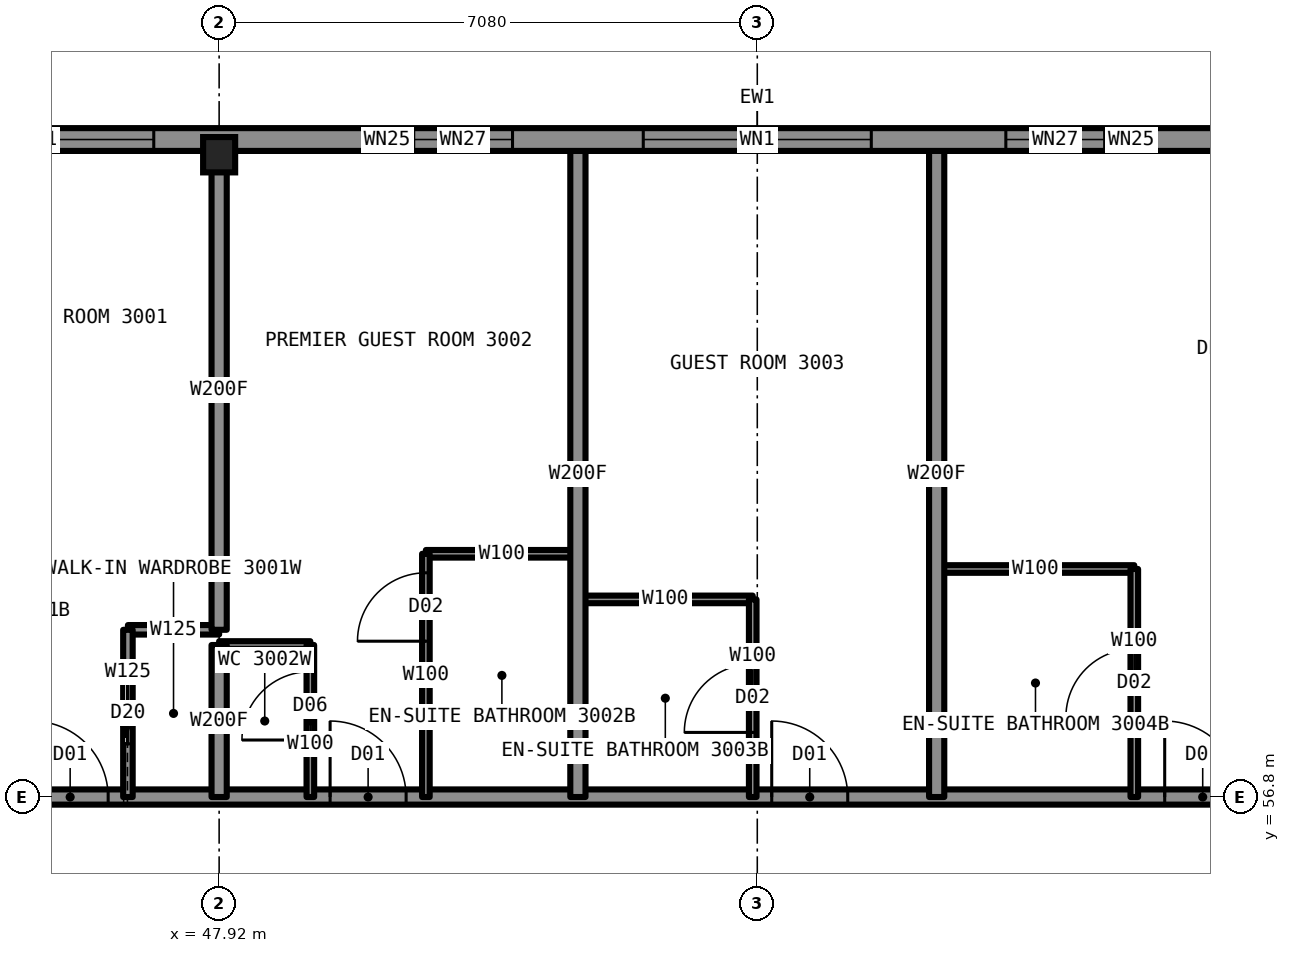
"""IFC4 building model, lengths in metres.
Left out: names, types, materials, properties, quantities, classifications, styles, units other than length and angle.
Written with IfcOpenShell. Run it as: python <this file> out.ifc"""

import sys

from ifc_helpers import new_model, si_unit, direction, frame, frame_2d, origin, origin_2d, place, context, subcontext, project, spatial, rectangle, i_section, extrude, element, fill, save


model = new_model("IFC4")
c1 = context("Model", 3, precision=1e-05, world=origin(), true_north=direction((0.0, 1.0)))
c2 = subcontext(c1, "Body", "Model", "MODEL_VIEW")
j1 = project(units=[si_unit("LENGTHUNIT", "METRE"), si_unit("PLANEANGLEUNIT", "RADIAN")], contexts=[c1])
p1 = place(None, origin())
s1 = spatial("IfcSite", under=j1, at=p1, CompositionType="ELEMENT")
p2 = place(p1, origin())
s2 = spatial("IfcBuilding", under=s1, at=p2, CompositionType="ELEMENT")
p3 = place(p2, frame((0.0, 0.0, 114.4)))
s3 = spatial("IfcBuildingStorey", under=s2, at=p3, CompositionType="ELEMENT", Elevation=114.4)
p4 = place(p3, frame((47.92, 65.25, 0.0), z_axis=(0.0, 0.0, 1.0), x_axis=(1.0, 0.0, 0.0)))
e1 = element("IfcColumn", 1, at=p4, inside=s3, PredefinedType="COLUMN", context=c2, shape_type="SweptSolid", body=[
    extrude(i_section(OverallWidth=0.422, OverallDepth=0.465, WebThickness=0.045, FlangeThickness=0.073, at=origin_2d()), origin(), (0.0, 0.0, 1.0), 3.5),
])
p5 = place(p3, frame((43.2, 56.8, 0.0), z_axis=(0.0, 0.0, 1.0), x_axis=(1.0, 0.0, 0.0)))
e2 = element("IfcWall", 2, at=p5, inside=s3, PredefinedType="PARTITIONING", context=c2, shape_type="SweptSolid", body=[
    extrude(rectangle(XDim=23.6, YDim=0.2, at=frame_2d((11.8, 0.0))), origin(), (0.0, 0.0, 1.0), 3.33),
])
p6 = place(p5, frame((2.26, 0.0, 0.0)))
e3 = element("IfcOpeningElement", 3, at=p6, cuts=e2, PredefinedType="OPENING", context=c2, shape_type="SweptSolid", body=[
    extrude(rectangle(XDim=1.0, YDim=2.2, at=frame_2d((0.5, 1.1))), frame((0.0, 0.11, 0.0), z_axis=(0.0, -1.0, 0.0), x_axis=(1.0, 0.0, 0.0)), (0.0, 0.0, 1.0), 0.22),
])
p7 = place(p5, frame((6.18, 0.0, 0.0)))
e4 = element("IfcOpeningElement", 4, at=p7, cuts=e2, PredefinedType="OPENING", context=c2, shape_type="SweptSolid", body=[
    extrude(rectangle(XDim=1.0, YDim=2.2, at=frame_2d((0.5, 1.1))), frame((0.0, 0.11, 0.0), z_axis=(0.0, -1.0, 0.0), x_axis=(1.0, 0.0, 0.0)), (0.0, 0.0, 1.0), 0.22),
])
p8 = place(p5, frame((11.99, 0.0, 0.0)))
e5 = element("IfcOpeningElement", 5, at=p8, cuts=e2, PredefinedType="OPENING", context=c2, shape_type="SweptSolid", body=[
    extrude(rectangle(XDim=1.0, YDim=2.2, at=frame_2d((0.5, 1.1))), frame((0.0, 0.11, 0.0), z_axis=(0.0, -1.0, 0.0), x_axis=(1.0, 0.0, 0.0)), (0.0, 0.0, 1.0), 0.22),
])
p9 = place(p5, frame((17.16, 0.0, 0.0)))
e6 = element("IfcOpeningElement", 6, at=p9, cuts=e2, PredefinedType="OPENING", context=c2, shape_type="SweptSolid", body=[
    extrude(rectangle(XDim=1.0, YDim=2.2, at=frame_2d((0.5, 1.1))), frame((0.0, 0.11, 0.0), z_axis=(0.0, -1.0, 0.0), x_axis=(1.0, 0.0, 0.0)), (0.0, 0.0, 1.0), 0.22),
])
p10 = place(p3, frame((47.92, 58.8, 0.0), z_axis=(0.0, 0.0, 1.0), x_axis=(1.0, 0.0, 0.0)))
e7 = element("IfcWall", 7, at=p10, inside=s3, PredefinedType="PARTITIONING", context=c2, shape_type="SweptSolid", body=[
    extrude(rectangle(XDim=1.2, YDim=0.1, at=frame_2d((0.6, 0.0))), origin(), (0.0, 0.0, 1.0), 3.33),
])
p11 = place(p3, frame((46.72, 59.0, 0.0), z_axis=(0.0, 0.0, 1.0), x_axis=(1.0, 0.0, 0.0)))
e8 = element("IfcWall", 8, at=p11, inside=s3, PredefinedType="PARTITIONING", context=c2, shape_type="SweptSolid", body=[
    extrude(rectangle(XDim=1.2, YDim=0.125, at=frame_2d((0.6, 0.0))), origin(), (0.0, 0.0, 1.0), 3.33),
])
p12 = place(p3, frame((52.64, 59.4, 0.0), z_axis=(0.0, 0.0, 1.0), x_axis=(1.0, 0.0, 0.0)))
e9 = element("IfcWall", 9, at=p12, inside=s3, PredefinedType="PARTITIONING", context=c2, shape_type="SweptSolid", body=[
    extrude(rectangle(XDim=2.3, YDim=0.1, at=frame_2d((1.15, 0.0))), origin(), (0.0, 0.0, 1.0), 3.33),
])
p13 = place(p3, frame((57.36, 59.8, 0.0), z_axis=(0.0, 0.0, 1.0), x_axis=(1.0, 0.0, 0.0)))
e10 = element("IfcWall", 10, at=p13, inside=s3, PredefinedType="PARTITIONING", context=c2, shape_type="SweptSolid", body=[
    extrude(rectangle(XDim=2.6, YDim=0.1, at=frame_2d((1.3, 0.0))), origin(), (0.0, 0.0, 1.0), 3.33),
])
p14 = place(p3, frame((50.64, 60.0, 0.0), z_axis=(0.0, 0.0, 1.0), x_axis=(1.0, 0.0, 0.0)))
e11 = element("IfcWall", 11, at=p14, inside=s3, PredefinedType="PARTITIONING", context=c2, shape_type="SweptSolid", body=[
    extrude(rectangle(XDim=2.0, YDim=0.1, at=frame_2d((1.0, 0.0))), origin(), (0.0, 0.0, 1.0), 2.731),
])
p15 = place(p3, frame((54.94, 56.8, 0.0), z_axis=(0.0, 0.0, 1.0), x_axis=(0.0, 1.0, 0.0)))
e12 = element("IfcWall", 12, at=p15, inside=s3, PredefinedType="PARTITIONING", context=c2, shape_type="SweptSolid", body=[
    extrude(rectangle(XDim=2.6, YDim=0.1, at=frame_2d((1.3, 0.0))), origin(), (0.0, 0.0, 1.0), 2.573),
])
p16 = place(p15, frame((0.85, 0.0, 0.0)))
e13 = element("IfcOpeningElement", 13, at=p16, cuts=e12, PredefinedType="OPENING", context=c2, shape_type="SweptSolid", body=[
    extrude(rectangle(XDim=0.9, YDim=2.1, at=frame_2d((0.45, 1.05))), frame((0.0, 0.06, 0.0), z_axis=(0.0, -1.0, 0.0), x_axis=(1.0, 0.0, 0.0)), (0.0, 0.0, 1.0), 0.12),
])
p17 = place(p3, frame((52.64, 56.8, 0.0), z_axis=(0.0, 0.0, 1.0), x_axis=(0.0, 1.0, 0.0)))
e14 = element("IfcWall", 14, at=p17, inside=s3, PredefinedType="PARTITIONING", context=c2, shape_type="SweptSolid", body=[
    extrude(rectangle(XDim=8.5, YDim=0.2, at=frame_2d((4.25, 0.0))), origin(), (0.0, 0.0, 1.0), 3.33),
])
p18 = place(p3, frame((50.64, 56.8, 0.0), z_axis=(0.0, 0.0, 1.0), x_axis=(0.0, 1.0, 0.0)))
e15 = element("IfcWall", 15, at=p18, inside=s3, PredefinedType="PARTITIONING", context=c2, shape_type="SweptSolid", body=[
    extrude(rectangle(XDim=3.2, YDim=0.1, at=frame_2d((1.6, 0.0))), origin(), (0.0, 0.0, 1.0), 3.33),
])
p19 = place(p18, frame((2.05, 0.0, 0.0)))
e16 = element("IfcOpeningElement", 16, at=p19, cuts=e15, PredefinedType="OPENING", context=c2, shape_type="SweptSolid", body=[
    extrude(rectangle(XDim=0.9, YDim=2.1, at=frame_2d((0.45, 1.05))), frame((0.0, 0.06, 0.0), z_axis=(0.0, -1.0, 0.0), x_axis=(1.0, 0.0, 0.0)), (0.0, 0.0, 1.0), 0.12),
])
p20 = place(p3, frame((49.12, 56.8, 0.0), z_axis=(0.0, 0.0, 1.0), x_axis=(0.0, 1.0, 0.0)))
e17 = element("IfcWall", 17, at=p20, inside=s3, PredefinedType="PARTITIONING", context=c2, shape_type="SweptSolid", body=[
    extrude(rectangle(XDim=2.0, YDim=0.1, at=frame_2d((1.0, 0.0))), origin(), (0.0, 0.0, 1.0), 3.33),
])
p21 = place(p20, frame((0.75, 0.0, 0.0)))
e18 = element("IfcOpeningElement", 18, at=p21, cuts=e17, PredefinedType="OPENING", context=c2, shape_type="SweptSolid", body=[
    extrude(rectangle(XDim=0.9, YDim=2.1, at=frame_2d((0.45, 1.05))), frame((0.0, 0.06, 0.0), z_axis=(0.0, -1.0, 0.0), x_axis=(1.0, 0.0, 0.0)), (0.0, 0.0, 1.0), 0.12),
])
p22 = place(p3, frame((47.92, 56.8, 0.0), z_axis=(0.0, 0.0, 1.0), x_axis=(0.0, 1.0, 0.0)))
e19 = element("IfcWall", 19, at=p22, inside=s3, PredefinedType="PARTITIONING", context=c2, shape_type="SweptSolid", body=[
    extrude(rectangle(XDim=2.0, YDim=0.2, at=frame_2d((1.0, 0.0))), origin(), (0.0, 0.0, 1.0), 2.573),
])
p23 = place(p3, frame((47.92, 59.0, 0.0), z_axis=(0.0, 0.0, 1.0), x_axis=(0.0, 1.0, 0.0)))
e20 = element("IfcWall", 20, at=p23, inside=s3, PredefinedType="PARTITIONING", context=c2, shape_type="SweptSolid", body=[
    extrude(rectangle(XDim=6.3, YDim=0.2, at=frame_2d((3.15, 0.0))), origin(), (0.0, 0.0, 1.0), 2.573),
])
p24 = place(p3, frame((46.72, 56.8, 0.0), z_axis=(0.0, 0.0, 1.0), x_axis=(0.0, 1.0, 0.0)))
e21 = element("IfcWall", 21, at=p24, inside=s3, PredefinedType="PARTITIONING", context=c2, shape_type="SweptSolid", body=[
    extrude(rectangle(XDim=2.2, YDim=0.125, at=frame_2d((1.1, 0.0))), origin(), (0.0, 0.0, 1.0), 3.33),
])
p25 = place(p24, frame((0.7, 0.0, 0.0)))
e22 = element("IfcOpeningElement", 22, at=p25, cuts=e21, PredefinedType="OPENING", context=c2, shape_type="SweptSolid", body=[
    extrude(rectangle(XDim=0.8, YDim=2.1, at=frame_2d((0.4, 1.05))), frame((0.0, 0.073, 0.0), z_axis=(0.0, -1.0, 0.0), x_axis=(1.0, 0.0, 0.0)), (0.0, 0.0, 1.0), 0.145),
])
p26 = place(p3, frame((57.36, 56.8, 0.0), z_axis=(0.0, 0.0, 1.0), x_axis=(0.0, 1.0, 0.0)))
e23 = element("IfcWall", 23, at=p26, inside=s3, PredefinedType="PARTITIONING", context=c2, shape_type="SweptSolid", body=[
    extrude(rectangle(XDim=8.5, YDim=0.2, at=frame_2d((4.25, 0.0))), origin(), (0.0, 0.0, 1.0), 3.33),
])
p27 = place(p3, frame((59.96, 56.8, 0.0), z_axis=(0.0, 0.0, 1.0), x_axis=(0.0, 1.0, 0.0)))
e24 = element("IfcWall", 24, at=p27, inside=s3, PredefinedType="PARTITIONING", context=c2, shape_type="SweptSolid", body=[
    extrude(rectangle(XDim=3.0, YDim=0.1, at=frame_2d((1.5, 0.0))), origin(), (0.0, 0.0, 1.0), 3.33),
])
p28 = place(p27, frame((1.05, 0.0, 0.0)))
e25 = element("IfcOpeningElement", 25, at=p28, cuts=e24, PredefinedType="OPENING", context=c2, shape_type="SweptSolid", body=[
    extrude(rectangle(XDim=0.9, YDim=2.1, at=frame_2d((0.45, 1.05))), frame((0.0, 0.06, 0.0), z_axis=(0.0, -1.0, 0.0), x_axis=(1.0, 0.0, 0.0)), (0.0, 0.0, 1.0), 0.12),
])
p29 = place(p3, frame((70.1, 65.45, 0.0), z_axis=(0.0, 0.0, 1.0), x_axis=(-1.0, 0.0, 0.0)))
e26 = element("IfcWall", 26, at=p29, inside=s3, PredefinedType="SOLIDWALL", context=c2, shape_type="SweptSolid", body=[
    extrude(rectangle(XDim=30.2, YDim=0.3, at=frame_2d((15.1, 0.0))), origin(), (0.0, 0.0, 1.0), 2.83),
])
p30 = place(p29, frame((0.85, 0.0, 0.5)))
e27 = element("IfcOpeningElement", 27, at=p30, cuts=e26, PredefinedType="OPENING", context=c2, shape_type="SweptSolid", body=[
    extrude(rectangle(XDim=1.6, YDim=2.0, at=frame_2d((0.8, 1.0))), frame((0.0, 0.16, 0.0), z_axis=(0.0, -1.0, 0.0), x_axis=(1.0, 0.0, 0.0)), (0.0, 0.0, 1.0), 0.32),
])
p31 = place(p29, frame((4.16, 0.0, 0.5)))
e28 = element("IfcOpeningElement", 28, at=p31, cuts=e26, PredefinedType="OPENING", context=c2, shape_type="SweptSolid", body=[
    extrude(rectangle(XDim=3.0, YDim=2.0, at=frame_2d((1.5, 1.0))), frame((0.0, 0.16, 0.0), z_axis=(0.0, -1.0, 0.0), x_axis=(1.0, 0.0, 0.0)), (0.0, 0.0, 1.0), 0.32),
])
p32 = place(p29, frame((10.53, 0.0, 0.5)))
e29 = element("IfcOpeningElement", 29, at=p32, cuts=e26, PredefinedType="OPENING", context=c2, shape_type="SweptSolid", body=[
    extrude(rectangle(XDim=1.3, YDim=1.9, at=frame_2d((0.65, 0.95))), frame((0.0, 0.16, 0.0), z_axis=(0.0, -1.0, 0.0), x_axis=(1.0, 0.0, 0.0)), (0.0, 0.0, 1.0), 0.32),
])
p33 = place(p29, frame((13.6, 0.0, 0.5)))
e30 = element("IfcOpeningElement", 30, at=p33, cuts=e26, PredefinedType="OPENING", context=c2, shape_type="SweptSolid", body=[
    extrude(rectangle(XDim=3.0, YDim=2.0, at=frame_2d((1.5, 1.0))), frame((0.0, 0.16, 0.0), z_axis=(0.0, -1.0, 0.0), x_axis=(1.0, 0.0, 0.0)), (0.0, 0.0, 1.0), 0.32),
])
p34 = place(p29, frame((18.32, 0.0, 0.5)))
e31 = element("IfcOpeningElement", 31, at=p34, cuts=e26, PredefinedType="OPENING", context=c2, shape_type="SweptSolid", body=[
    extrude(rectangle(XDim=1.3, YDim=1.9, at=frame_2d((0.65, 0.95))), frame((0.0, 0.16, 0.0), z_axis=(0.0, -1.0, 0.0), x_axis=(1.0, 0.0, 0.0)), (0.0, 0.0, 1.0), 0.32),
])
p35 = place(p29, frame((23.04, 0.0, 0.5)))
e32 = element("IfcOpeningElement", 32, at=p35, cuts=e26, PredefinedType="OPENING", context=c2, shape_type="SweptSolid", body=[
    extrude(rectangle(XDim=3.0, YDim=2.0, at=frame_2d((1.5, 1.0))), frame((0.0, 0.16, 0.0), z_axis=(0.0, -1.0, 0.0), x_axis=(1.0, 0.0, 0.0)), (0.0, 0.0, 1.0), 0.32),
])
p36 = place(p29, frame((27.75, 0.0, 0.5)))
e33 = element("IfcOpeningElement", 33, at=p36, cuts=e26, PredefinedType="OPENING", context=c2, shape_type="SweptSolid", body=[
    extrude(rectangle(XDim=1.6, YDim=2.0, at=frame_2d((0.8, 1.0))), frame((0.0, 0.16, 0.0), z_axis=(0.0, -1.0, 0.0), x_axis=(1.0, 0.0, 0.0)), (0.0, 0.0, 1.0), 0.32),
])
p37 = place(p29, frame((9.88, 0.0, 0.5)))
e34 = element("IfcOpeningElement", 34, at=p37, cuts=e26, PredefinedType="OPENING", context=c2, shape_type="SweptSolid", body=[
    extrude(rectangle(XDim=0.6, YDim=0.9, at=frame_2d((0.3, 0.45))), frame((0.0, 0.16, 0.0), z_axis=(0.0, -1.0, 0.0), x_axis=(1.0, 0.0, 0.0)), (0.0, 0.0, 1.0), 0.32),
])
p38 = place(p29, frame((19.67, 0.0, 0.5)))
e35 = element("IfcOpeningElement", 35, at=p38, cuts=e26, PredefinedType="OPENING", context=c2, shape_type="SweptSolid", body=[
    extrude(rectangle(XDim=0.6, YDim=0.9, at=frame_2d((0.3, 0.45))), frame((0.0, 0.16, 0.0), z_axis=(0.0, -1.0, 0.0), x_axis=(1.0, 0.0, 0.0)), (0.0, 0.0, 1.0), 0.32),
])
p39 = place(p6, origin())
e36 = element("IfcDoor", 36, at=p39, inside=s3, OperationType="SINGLE_SWING_LEFT", PredefinedType="DOOR", context=c2, shape_type="SweptSolid", body=[
    extrude(rectangle(XDim=1.0, YDim=2.2, at=frame_2d((0.5, 1.1))), frame((0.0, 0.025, 0.0), z_axis=(0.0, -1.0, 0.0), x_axis=(1.0, 0.0, 0.0)), (0.0, 0.0, 1.0), 0.05),
])
fill(e3, e36)
p40 = place(p25, origin())
e37 = element("IfcDoor", 37, at=p40, inside=s3, OperationType="SLIDING_TO_LEFT", PredefinedType="DOOR", context=c2, shape_type="SweptSolid", body=[
    extrude(rectangle(XDim=0.8, YDim=2.1, at=frame_2d((0.4, 1.05))), frame((0.0, 0.025, 0.0), z_axis=(0.0, -1.0, 0.0), x_axis=(1.0, 0.0, 0.0)), (0.0, 0.0, 1.0), 0.05),
])
fill(e22, e37)
p41 = place(p7, origin())
e38 = element("IfcDoor", 38, at=p41, inside=s3, OperationType="SINGLE_SWING_LEFT", PredefinedType="DOOR", context=c2, shape_type="SweptSolid", body=[
    extrude(rectangle(XDim=1.0, YDim=2.2, at=frame_2d((0.5, 1.1))), frame((0.0, 0.025, 0.0), z_axis=(0.0, -1.0, 0.0), x_axis=(1.0, 0.0, 0.0)), (0.0, 0.0, 1.0), 0.05),
])
fill(e4, e38)
p42 = place(p19, origin())
e39 = element("IfcDoor", 39, at=p42, inside=s3, OperationType="SINGLE_SWING_RIGHT", PredefinedType="DOOR", context=c2, shape_type="SweptSolid", body=[
    extrude(rectangle(XDim=0.9, YDim=2.1, at=frame_2d((0.45, 1.05))), frame((0.0, 0.025, 0.0), z_axis=(0.0, -1.0, 0.0), x_axis=(1.0, 0.0, 0.0)), (0.0, 0.0, 1.0), 0.05),
])
fill(e16, e39)
p43 = place(p21, origin())
e40 = element("IfcDoor", 40, at=p43, inside=s3, OperationType="SINGLE_SWING_LEFT", PredefinedType="DOOR", context=c2, shape_type="SweptSolid", body=[
    extrude(rectangle(XDim=0.9, YDim=2.1, at=frame_2d((0.45, 1.05))), frame((0.0, 0.025, 0.0), z_axis=(0.0, -1.0, 0.0), x_axis=(1.0, 0.0, 0.0)), (0.0, 0.0, 1.0), 0.05),
])
fill(e18, e40)
p44 = place(p8, origin())
e41 = element("IfcDoor", 41, at=p44, inside=s3, OperationType="SINGLE_SWING_LEFT", PredefinedType="DOOR", context=c2, shape_type="SweptSolid", body=[
    extrude(rectangle(XDim=1.0, YDim=2.2, at=frame_2d((0.5, 1.1))), frame((0.0, 0.025, 0.0), z_axis=(0.0, -1.0, 0.0), x_axis=(1.0, 0.0, 0.0)), (0.0, 0.0, 1.0), 0.05),
])
fill(e5, e41)
p45 = place(p16, origin())
e42 = element("IfcDoor", 42, at=p45, inside=s3, OperationType="SINGLE_SWING_RIGHT", PredefinedType="DOOR", context=c2, shape_type="SweptSolid", body=[
    extrude(rectangle(XDim=0.9, YDim=2.1, at=frame_2d((0.45, 1.05))), frame((0.0, 0.025, 0.0), z_axis=(0.0, -1.0, 0.0), x_axis=(1.0, 0.0, 0.0)), (0.0, 0.0, 1.0), 0.05),
])
fill(e13, e42)
p46 = place(p9, origin())
e43 = element("IfcDoor", 43, at=p46, inside=s3, OperationType="SINGLE_SWING_LEFT", PredefinedType="DOOR", context=c2, shape_type="SweptSolid", body=[
    extrude(rectangle(XDim=1.0, YDim=2.2, at=frame_2d((0.5, 1.1))), frame((0.0, 0.025, 0.0), z_axis=(0.0, -1.0, 0.0), x_axis=(1.0, 0.0, 0.0)), (0.0, 0.0, 1.0), 0.05),
])
fill(e6, e43)
p47 = place(p28, origin())
e44 = element("IfcDoor", 44, at=p47, inside=s3, OperationType="SINGLE_SWING_RIGHT", PredefinedType="DOOR", context=c2, shape_type="SweptSolid", body=[
    extrude(rectangle(XDim=0.9, YDim=2.1, at=frame_2d((0.45, 1.05))), frame((0.0, 0.025, 0.0), z_axis=(0.0, -1.0, 0.0), x_axis=(1.0, 0.0, 0.0)), (0.0, 0.0, 1.0), 0.05),
])
fill(e25, e44)
p48 = place(p32, origin())
e45 = element("IfcWindow", 45, at=p48, inside=s3, PartitioningType="SINGLE_PANEL", PredefinedType="WINDOW", context=c2, shape_type="SweptSolid", body=[
    extrude(rectangle(XDim=1.3, YDim=1.9, at=frame_2d((0.65, 0.95))), frame((0.0, 0.03, 0.0), z_axis=(0.0, -1.0, 0.0), x_axis=(1.0, 0.0, 0.0)), (0.0, 0.0, 1.0), 0.06),
])
fill(e29, e45)
p49 = place(p33, origin())
e46 = element("IfcWindow", 46, at=p49, inside=s3, PartitioningType="SINGLE_PANEL", PredefinedType="WINDOW", context=c2, shape_type="SweptSolid", body=[
    extrude(rectangle(XDim=3.0, YDim=2.0, at=frame_2d((1.5, 1.0))), frame((0.0, 0.03, 0.0), z_axis=(0.0, -1.0, 0.0), x_axis=(1.0, 0.0, 0.0)), (0.0, 0.0, 1.0), 0.06),
])
fill(e30, e46)
p50 = place(p34, origin())
e47 = element("IfcWindow", 47, at=p50, inside=s3, PartitioningType="SINGLE_PANEL", PredefinedType="WINDOW", context=c2, shape_type="SweptSolid", body=[
    extrude(rectangle(XDim=1.3, YDim=1.9, at=frame_2d((0.65, 0.95))), frame((0.0, 0.03, 0.0), z_axis=(0.0, -1.0, 0.0), x_axis=(1.0, 0.0, 0.0)), (0.0, 0.0, 1.0), 0.06),
])
fill(e31, e47)
p51 = place(p35, origin())
e48 = element("IfcWindow", 48, at=p51, inside=s3, PartitioningType="SINGLE_PANEL", PredefinedType="WINDOW", context=c2, shape_type="SweptSolid", body=[
    extrude(rectangle(XDim=3.0, YDim=2.0, at=frame_2d((1.5, 1.0))), frame((0.0, 0.03, 0.0), z_axis=(0.0, -1.0, 0.0), x_axis=(1.0, 0.0, 0.0)), (0.0, 0.0, 1.0), 0.06),
])
fill(e32, e48)
p52 = place(p37, origin())
e49 = element("IfcWindow", 49, at=p52, inside=s3, PartitioningType="SINGLE_PANEL", PredefinedType="WINDOW", context=c2, shape_type="SweptSolid", body=[
    extrude(rectangle(XDim=0.6, YDim=0.9, at=frame_2d((0.3, 0.45))), frame((0.0, 0.03, 0.0), z_axis=(0.0, -1.0, 0.0), x_axis=(1.0, 0.0, 0.0)), (0.0, 0.0, 1.0), 0.06),
])
fill(e34, e49)
p53 = place(p38, origin())
e50 = element("IfcWindow", 50, at=p53, inside=s3, PartitioningType="SINGLE_PANEL", PredefinedType="WINDOW", context=c2, shape_type="SweptSolid", body=[
    extrude(rectangle(XDim=0.6, YDim=0.9, at=frame_2d((0.3, 0.45))), frame((0.0, 0.03, 0.0), z_axis=(0.0, -1.0, 0.0), x_axis=(1.0, 0.0, 0.0)), (0.0, 0.0, 1.0), 0.06),
])
fill(e35, e50)
save(model, sys.argv[1])
